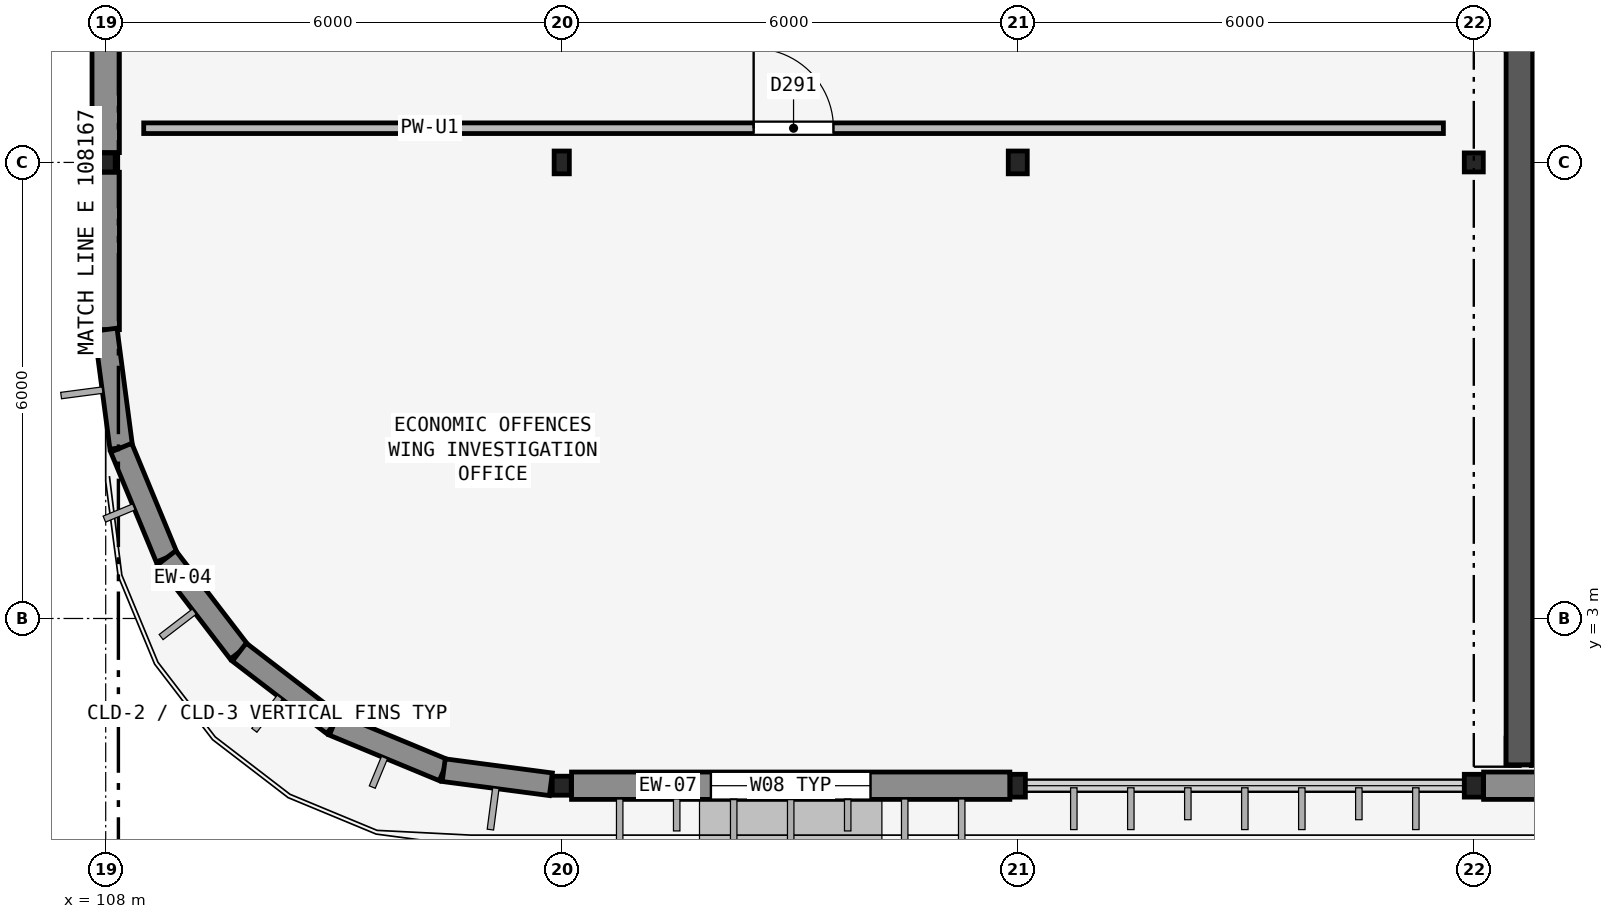
"""IFC4 building model, lengths in metres.
Left out: names, types, materials, properties, quantities, classifications, styles, units other than length and angle.
Written with IfcOpenShell. Run it as: python <this file> out.ifc"""

import sys

from ifc_helpers import new_model, si_unit, direction, frame, frame_2d, origin, origin_2d, place, context, subcontext, project, spatial, rectangle, hollow_rectangle, i_section, extrude, element, fill, save


model = new_model("IFC4")
c1 = context("Model", 3, precision=1e-05, world=origin(), true_north=direction((0.0, 1.0)))
c2 = subcontext(c1, "Body", "Model", "MODEL_VIEW")
j1 = project(units=[si_unit("LENGTHUNIT", "METRE"), si_unit("PLANEANGLEUNIT", "RADIAN")], contexts=[c1])
p1 = place(None, origin())
s1 = spatial("IfcSite", under=j1, at=p1, CompositionType="ELEMENT")
p2 = place(p1, origin())
s2 = spatial("IfcBuilding", under=s1, at=p2, CompositionType="ELEMENT")
p3 = place(p2, frame((0.0, 0.0, 26.1)))
s3 = spatial("IfcBuildingStorey", under=s2, at=p3, CompositionType="ELEMENT", Elevation=26.1)
for number, where, z_axis, x_axis in (
    (1, (108.0, 9.0, 0.0), (0.0, 0.0, 1.0), (1.0, 0.0, 0.0)),
    (2, (114.0, 0.8, 0.0), (0.0, 0.0, 1.0), (1.0, 0.0, 0.0)),
):
    element("IfcColumn", number, at=place(p3, frame(where, z_axis=z_axis, x_axis=x_axis)), inside=s3, PredefinedType="COLUMN", context=c2, shape_type="SweptSolid", body=[
        extrude(hollow_rectangle(XDim=0.25, YDim=0.25, WallThickness=0.012, InnerFilletRadius=0.012, OuterFilletRadius=0.024, at=origin_2d()), origin(), (0.0, 0.0, 1.0), 3.9),
    ])
for number, where, z_axis, x_axis in (
    (3, (114.0, 9.0, 0.0), (0.0, 0.0, 1.0), (1.0, 0.0, 0.0)),
    (4, (120.0, 0.8, 0.0), (0.0, 0.0, 1.0), (1.0, 0.0, 0.0)),
):
    element("IfcColumn", number, at=place(p3, frame(where, z_axis=z_axis, x_axis=x_axis)), inside=s3, PredefinedType="COLUMN", context=c2, shape_type="SweptSolid", body=[
        extrude(hollow_rectangle(XDim=0.2, YDim=0.3, WallThickness=0.012, InnerFilletRadius=0.012, OuterFilletRadius=0.024, at=origin_2d()), origin(), (0.0, 0.0, 1.0), 3.9),
    ])
for number, where, z_axis, x_axis in (
    (5, (120.0, 9.0, 0.0), (0.0, 0.0, 1.0), (1.0, 0.0, 0.0)),
    (6, (126.0, 0.8, 0.0), (0.0, 0.0, 1.0), (1.0, 0.0, 0.0)),
):
    element("IfcColumn", number, at=place(p3, frame(where, z_axis=z_axis, x_axis=x_axis)), inside=s3, PredefinedType="COLUMN", context=c2, shape_type="SweptSolid", body=[
        extrude(i_section(OverallWidth=0.25, OverallDepth=0.3, WebThickness=0.01, FlangeThickness=0.01, FilletRadius=0.012, at=origin_2d()), origin(), (0.0, 0.0, 1.0), 3.9),
    ])
p4 = place(p3, frame((126.0, 9.0, 0.0), z_axis=(0.0, 0.0, 1.0), x_axis=(1.0, 0.0, 0.0)))
e7 = element("IfcColumn", 7, at=p4, inside=s3, PredefinedType="COLUMN", context=c2, shape_type="SweptSolid", body=[
    extrude(hollow_rectangle(XDim=0.25, YDim=0.25, WallThickness=0.012, InnerFilletRadius=0.012, OuterFilletRadius=0.024, at=origin_2d()), origin(), (0.0, 0.0, 1.0), 3.9),
])
p5 = place(p3, frame((114.129, 0.8, 0.0), z_axis=(0.0, 0.0, 1.0), x_axis=(1.0, 0.0, 0.0)))
e8 = element("IfcWall", 8, at=p5, inside=s3, PredefinedType="SOLIDWALL", context=c2, shape_type="SweptSolid", body=[
    extrude(rectangle(XDim=5.767, YDim=0.36, at=frame_2d((2.884, 0.0))), origin(), (0.0, 0.0, 1.0), 3.28),
])
p6 = place(p5, frame((1.833, 0.0, 0.9)))
e9 = element("IfcOpeningElement", 9, at=p6, cuts=e8, PredefinedType="OPENING", context=c2, shape_type="SweptSolid", body=[
    extrude(rectangle(XDim=2.1, YDim=1.5, at=frame_2d((1.05, 0.75))), frame((0.0, 0.19, 0.0), z_axis=(0.0, -1.0, 0.0), x_axis=(1.0, 0.0, 0.0)), (0.0, 0.0, 1.0), 0.38),
])
p7 = place(p3, frame((126.129, 0.8, 0.0), z_axis=(0.0, 0.0, 1.0), x_axis=(1.0, 0.0, 0.0)))
e10 = element("IfcWall", 10, at=p7, inside=s3, PredefinedType="SOLIDWALL", context=c2, shape_type="SweptSolid", body=[
    extrude(rectangle(XDim=5.742, YDim=0.36, at=frame_2d((2.871, 0.0))), origin(), (0.0, 0.0, 1.0), 3.28),
])
p8 = place(p3, frame((108.0, 6.8, 0.0), z_axis=(0.0, 0.0, 1.0), x_axis=(0.0, 1.0, 0.0)))
e11 = element("IfcWall", 11, at=p8, inside=s3, PredefinedType="SOLIDWALL", context=c2, shape_type="SweptSolid", body=[
    extrude(rectangle(XDim=2.071, YDim=0.36, at=frame_2d((1.036, 0.0))), origin(), (0.0, 0.0, 1.0), 3.18),
])
p9 = place(p3, frame((108.0, 9.129, 0.0), z_axis=(0.0, 0.0, 1.0), x_axis=(0.0, 1.0, 0.0)))
e12 = element("IfcWall", 12, at=p9, inside=s3, PredefinedType="SOLIDWALL", context=c2, shape_type="SweptSolid", body=[
    extrude(rectangle(XDim=5.717, YDim=0.36, at=frame_2d((2.858, 0.0))), origin(), (0.0, 0.0, 1.0), 3.18),
])
p10 = place(p9, frame((1.809, 0.0, 0.9)))
e13 = element("IfcOpeningElement", 13, at=p10, cuts=e12, PredefinedType="OPENING", context=c2, shape_type="SweptSolid", body=[
    extrude(rectangle(XDim=2.1, YDim=1.5, at=frame_2d((1.05, 0.75))), frame((0.0, 0.19, 0.0), z_axis=(0.0, -1.0, 0.0), x_axis=(1.0, 0.0, 0.0)), (0.0, 0.0, 1.0), 0.38),
])
p11 = place(p3, frame((108.0, 6.8, 0.0), z_axis=(0.0, 0.0, 1.0), x_axis=(0.130458544462, -0.991453765022, 0.0)))
e14 = element("IfcWall", 14, at=p11, inside=s3, PredefinedType="SOLIDWALL", context=c2, shape_type="SweptSolid", body=[
    extrude(rectangle(XDim=1.566, YDim=0.3, at=frame_2d((0.783, 0.0))), origin(), (0.0, 0.0, 1.0), 3.685),
])
p12 = place(p3, frame((108.204, 5.247, 0.0), z_axis=(0.0, 0.0, 1.0), x_axis=(0.382677606907, -0.923881945474, 0.0)))
e15 = element("IfcWall", 15, at=p12, inside=s3, PredefinedType="SOLIDWALL", context=c2, shape_type="SweptSolid", body=[
    extrude(rectangle(XDim=1.566, YDim=0.3, at=frame_2d((0.783, 0.0))), origin(), (0.0, 0.0, 1.0), 3.685),
])
for number, where, z_axis, x_axis in (
    (16, (108.804, 3.8, 0.0), (0.0, 0.0, 1.0), (0.609, -0.793, 0.0)),
    (17, (109.757, 2.557, 0.0), (0.0, 0.0, 1.0), (0.793, -0.609, 0.0)),
):
    element("IfcWall", number, at=place(p3, frame(where, z_axis=z_axis, x_axis=x_axis)), inside=s3, PredefinedType="SOLIDWALL", context=c2, shape_type="SweptSolid", body=[
        extrude(rectangle(XDim=1.566, YDim=0.3, at=frame_2d((0.783, 0.0))), origin(), (0.0, 0.0, 1.0), 3.685),
    ])
p13 = place(p3, frame((111.0, 1.604, 0.0), z_axis=(0.0, 0.0, 1.0), x_axis=(0.923881945474, -0.382677606907, 0.0)))
e18 = element("IfcWall", 18, at=p13, inside=s3, PredefinedType="SOLIDWALL", context=c2, shape_type="SweptSolid", body=[
    extrude(rectangle(XDim=1.566, YDim=0.3, at=frame_2d((0.783, 0.0))), origin(), (0.0, 0.0, 1.0), 3.685),
])
p14 = place(p3, frame((112.447, 1.004, 0.0), z_axis=(0.0, 0.0, 1.0), x_axis=(0.99145137358, -0.130476717562, 0.0)))
e19 = element("IfcWall", 19, at=p14, inside=s3, PredefinedType="SOLIDWALL", context=c2, shape_type="SweptSolid", body=[
    extrude(rectangle(XDim=1.422, YDim=0.3, at=frame_2d((0.711, 0.0))), origin(), (0.0, 0.0, 1.0), 3.28),
])
p15 = place(p3, frame((126.425, 1.25, 0.0), z_axis=(0.0, 0.0, 1.0), x_axis=(1.0, 0.0, 0.0)))
e20 = element("IfcWall", 20, at=p15, inside=s3, PredefinedType="SHEAR", context=c2, shape_type="SweptSolid", body=[
    extrude(rectangle(XDim=5.15, YDim=0.35, at=frame_2d((2.575, 0.0))), origin(), (0.0, 0.0, 1.0), 3.76),
])
p16 = place(p3, frame((126.6, 10.825, 0.0), z_axis=(0.0, 0.0, 1.0), x_axis=(0.0, -1.0, 0.0)))
e21 = element("IfcWall", 21, at=p16, inside=s3, PredefinedType="SHEAR", context=c2, shape_type="SweptSolid", body=[
    extrude(rectangle(XDim=9.75, YDim=0.35, at=frame_2d((4.875, 0.0))), origin(), (0.0, 0.0, 1.0), 3.76),
])
p17 = place(p3, frame((108.5, 9.45, 0.0), z_axis=(0.0, 0.0, 1.0), x_axis=(1.0, 0.0, 0.0)))
e22 = element("IfcWall", 22, at=p17, inside=s3, PredefinedType="PARTITIONING", context=c2, shape_type="SweptSolid", body=[
    extrude(rectangle(XDim=17.1, YDim=0.14, at=frame_2d((8.55, 0.0))), origin(), (0.0, 0.0, 1.0), 3.273),
])
p18 = place(p17, frame((8.025, 0.0, 0.0)))
e23 = element("IfcOpeningElement", 23, at=p18, cuts=e22, PredefinedType="OPENING", context=c2, shape_type="SweptSolid", body=[
    extrude(rectangle(XDim=1.05, YDim=2.2, at=frame_2d((0.525, 1.1))), frame((0.0, 0.08, 0.0), z_axis=(0.0, -1.0, 0.0), x_axis=(1.0, 0.0, 0.0)), (0.0, 0.0, 1.0), 0.16),
])
p19 = place(p6, origin())
e24 = element("IfcWindow", 24, at=p19, inside=s3, PartitioningType="SINGLE_PANEL", PredefinedType="WINDOW", context=c2, shape_type="SweptSolid", body=[
    extrude(rectangle(XDim=2.1, YDim=1.5, at=frame_2d((1.05, 0.75))), frame((0.0, 0.03, 0.0), z_axis=(0.0, -1.0, 0.0), x_axis=(1.0, 0.0, 0.0)), (0.0, 0.0, 1.0), 0.06),
])
fill(e9, e24)
p20 = place(p18, origin())
e25 = element("IfcDoor", 25, at=p20, inside=s3, OperationType="SINGLE_SWING_LEFT", PredefinedType="DOOR", context=c2, shape_type="SweptSolid", body=[
    extrude(rectangle(XDim=1.05, YDim=2.2, at=frame_2d((0.525, 1.1))), frame((0.0, 0.025, 0.0), z_axis=(0.0, -1.0, 0.0), x_axis=(1.0, 0.0, 0.0)), (0.0, 0.0, 1.0), 0.05),
])
fill(e23, e25)
save(model, sys.argv[1])
